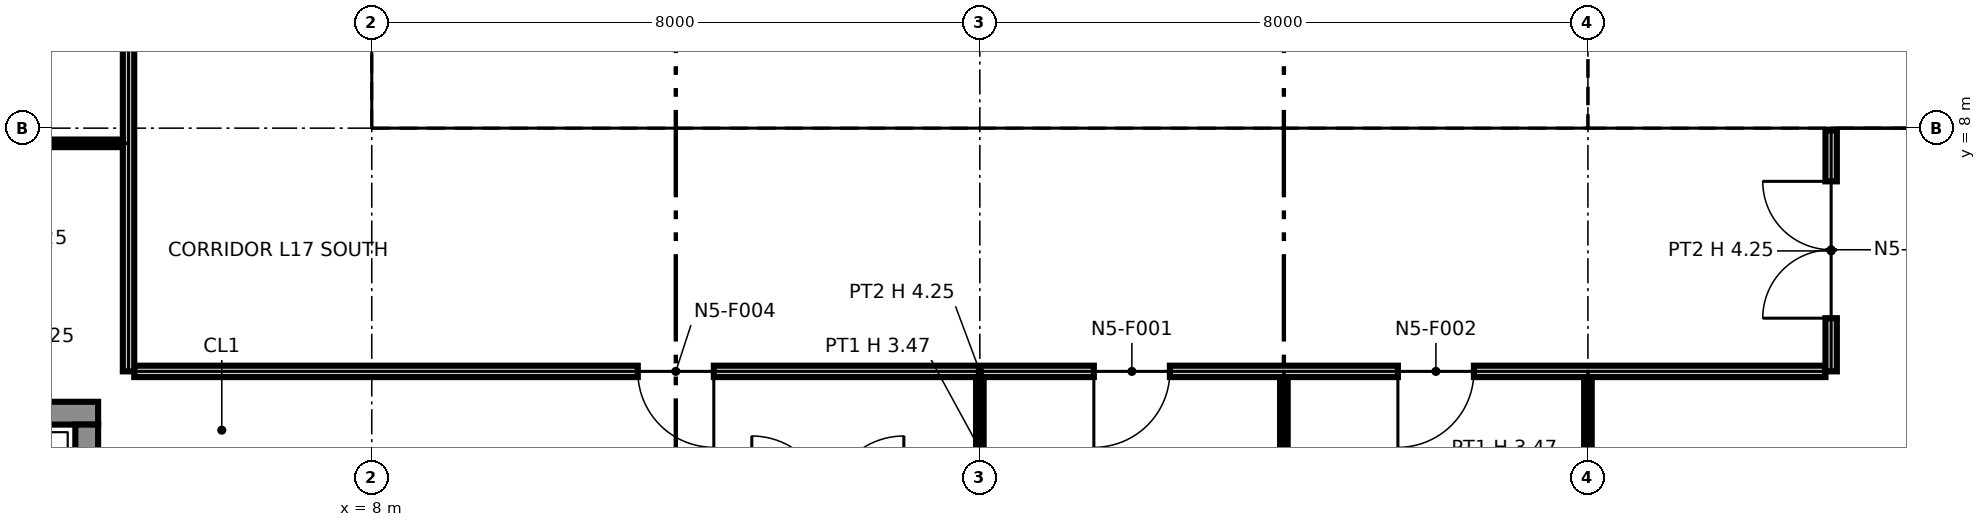
"""IFC4 building model, lengths in metres.
Left out: names, types, materials, properties, quantities, classifications, styles, units other than length and angle.
Written with IfcOpenShell. Run it as: python <this file> out.ifc"""

import sys

from ifc_helpers import new_model, si_unit, direction, frame, frame_2d, origin, origin_2d, place, context, subcontext, project, spatial, polyline, rectangle, i_section, outline, extrude, element, fill, save


model = new_model("IFC4")
c1 = context("Model", 3, precision=1e-05, world=origin(), true_north=direction((0.0, 1.0)))
c2 = subcontext(c1, "Body", "Model", "MODEL_VIEW")
j1 = project(units=[si_unit("LENGTHUNIT", "METRE"), si_unit("PLANEANGLEUNIT", "RADIAN")], contexts=[c1])
p1 = place(None, origin())
s1 = spatial("IfcSite", under=j1, at=p1, CompositionType="ELEMENT")
p2 = place(p1, origin())
s2 = spatial("IfcBuilding", under=s1, at=p2, CompositionType="ELEMENT")
p3 = place(p2, frame((0.0, 0.0, 92.0)))
s3 = spatial("IfcBuildingStorey", under=s2, at=p3, CompositionType="ELEMENT", Elevation=92.0)
for number, where, z_axis, x_axis in (
    (1, (8.0, 8.0, 0.0), (0.0, 0.0, 1.0), (1.0, 0.0, 0.0)),
    (2, (16.0, 8.0, 0.0), (0.0, 0.0, 1.0), (1.0, 0.0, 0.0)),
):
    element("IfcColumn", number, at=place(p3, frame(where, z_axis=z_axis, x_axis=x_axis)), inside=s3, PredefinedType="COLUMN", context=c2, shape_type="SweptSolid", body=[
        extrude(i_section(OverallWidth=0.406, OverallDepth=0.417, WebThickness=0.03, FlangeThickness=0.048, at=origin_2d()), origin(), (0.0, 0.0, 1.0), 4.25),
    ])
p4 = place(p3, frame((24.0, 8.0, 0.0), z_axis=(0.0, 0.0, 1.0), x_axis=(1.0, 0.0, 0.0)))
e3 = element("IfcColumn", 3, at=p4, inside=s3, PredefinedType="COLUMN", context=c2, shape_type="SweptSolid", body=[
    extrude(i_section(OverallWidth=0.411, OverallDepth=0.434, WebThickness=0.036, FlangeThickness=0.057, at=origin_2d()), origin(), (0.0, 0.0, 1.0), 4.25),
])
p5 = place(p3, frame((2.1, 4.25, 0.0), z_axis=(0.0, 0.0, 1.0), x_axis=(1.0, 0.0, 0.0)))
e4 = element("IfcWall", 4, at=p5, inside=s3, PredefinedType="SOLIDWALL", context=c2, shape_type="SweptSolid", body=[
    extrude(rectangle(XDim=2.3, YDim=0.3, at=frame_2d((1.15, 0.0))), origin(), (0.0, 0.0, 1.0), 4.25),
])
p6 = place(p3, frame((4.25, 4.1, 0.0), z_axis=(0.0, 0.0, 1.0), x_axis=(0.0, -1.0, 0.0)))
e5 = element("IfcWall", 5, at=p6, inside=s3, PredefinedType="SOLIDWALL", context=c2, shape_type="SweptSolid", body=[
    extrude(rectangle(XDim=1.7, YDim=0.3, at=frame_2d((0.85, 0.0))), origin(), (0.0, 0.0, 1.0), 4.25),
])
p7 = place(p3, frame((8.65, 8.75, 0.0), z_axis=(0.0, 0.0, 1.0), x_axis=(1.0, 0.0, 0.0)))
e6 = element("IfcWall", 6, at=p7, inside=s3, PredefinedType="PARTITIONING", context=c2, shape_type="SweptSolid", body=[
    extrude(outline(polyline([(0.0, 0.0), (14.7, 0.0), (14.7, 4.25), (7.469, 4.25), (7.469, 3.632), (7.231, 3.632), (7.23, 4.25), (0.0, 4.25), (0.0, 0.0)])), frame((0.0, 0.1, 0.0), z_axis=(0.0, -1.0, 0.0), x_axis=(1.0, 0.0, 0.0)), (0.0, 0.0, 1.0), 0.2),
])
p8 = place(p7, frame((1.3, 0.0, 0.0)))
e7 = element("IfcOpeningElement", 7, at=p8, cuts=e6, PredefinedType="OPENING", context=c2, shape_type="SweptSolid", body=[
    extrude(rectangle(XDim=1.4, YDim=2.1, at=frame_2d((0.7, 1.05))), frame((0.0, 0.11, 0.0), z_axis=(0.0, -1.0, 0.0), x_axis=(1.0, 0.0, 0.0)), (0.0, 0.0, 1.0), 0.22),
])
p9 = place(p7, frame((4.6, 0.0, 0.0)))
e8 = element("IfcOpeningElement", 8, at=p9, cuts=e6, PredefinedType="OPENING", context=c2, shape_type="SweptSolid", body=[
    extrude(rectangle(XDim=1.4, YDim=2.1, at=frame_2d((0.7, 1.05))), frame((0.0, 0.11, 0.0), z_axis=(0.0, -1.0, 0.0), x_axis=(1.0, 0.0, 0.0)), (0.0, 0.0, 1.0), 0.22),
])
p10 = place(p7, frame((10.4, 0.0, 0.0)))
e9 = element("IfcOpeningElement", 9, at=p10, cuts=e6, PredefinedType="OPENING", context=c2, shape_type="SweptSolid", body=[
    extrude(rectangle(XDim=1.2, YDim=2.1, at=frame_2d((0.6, 1.05))), frame((0.0, 0.11, 0.0), z_axis=(0.0, -1.0, 0.0), x_axis=(1.0, 0.0, 0.0)), (0.0, 0.0, 1.0), 0.22),
])
p11 = place(p3, frame((8.75, 8.85, 0.0), z_axis=(0.0, 0.0, 1.0), x_axis=(0.0, 1.0, 0.0)))
e10 = element("IfcWall", 10, at=p11, inside=s3, PredefinedType="PARTITIONING", context=c2, shape_type="SweptSolid", body=[
    extrude(outline(polyline([(0.0, 0.0), (14.3, 0.0), (14.3, 4.25), (10.231, 4.25), (10.23, 3.789), (10.07, 3.789), (10.069, 4.25), (7.27, 4.25), (7.269, 3.632), (7.031, 3.632), (7.031, 4.25), (0.0, 4.25), (0.0, 0.0)])), frame((0.0, 0.1, 0.0), z_axis=(0.0, -1.0, 0.0), x_axis=(1.0, 0.0, 0.0)), (0.0, 0.0, 1.0), 0.2),
])
p12 = place(p11, frame((8.3, 0.0, 0.0)))
e11 = element("IfcOpeningElement", 11, at=p12, cuts=e10, PredefinedType="OPENING", context=c2, shape_type="SweptSolid", body=[
    extrude(rectangle(XDim=1.8, YDim=2.1, at=frame_2d((0.9, 1.05))), frame((0.0, 0.11, 0.0), z_axis=(0.0, -1.0, 0.0), x_axis=(1.0, 0.0, 0.0)), (0.0, 0.0, 1.0), 0.22),
])
p13 = place(p3, frame((12.4, 8.85, 0.0), z_axis=(0.0, 0.0, 1.0), x_axis=(0.0, 1.0, 0.0)))
e12 = element("IfcWall", 12, at=p13, inside=s3, PredefinedType="PARTITIONING", context=c2, shape_type="SweptSolid", body=[
    extrude(rectangle(XDim=6.85, YDim=0.2, at=frame_2d((3.425, 0.0))), origin(), (0.0, 0.0, 1.0), 4.25),
])
p14 = place(p3, frame((15.85, 8.85, 0.0), z_axis=(0.0, 0.0, 1.0), x_axis=(0.0, 1.0, 0.0)))
e13 = element("IfcWall", 13, at=p14, inside=s3, PredefinedType="PARTITIONING", context=c2, shape_type="SweptSolid", body=[
    extrude(rectangle(XDim=1.55, YDim=0.9, at=frame_2d((0.775, 0.0))), origin(), (0.0, 0.0, 1.0), 3.632),
])
p15 = place(p14, frame((0.3, 0.0, 0.0)))
e14 = element("IfcOpeningElement", 14, at=p15, cuts=e13, PredefinedType="OPENING", context=c2, shape_type="SweptSolid", body=[
    extrude(rectangle(XDim=1.1, YDim=2.1, at=frame_2d((0.55, 1.05))), frame((0.0, 0.46, 0.0), z_axis=(0.0, -1.0, 0.0), x_axis=(1.0, 0.0, 0.0)), (0.0, 0.0, 1.0), 0.92),
])
p16 = place(p3, frame((23.25, 8.85, 0.0), z_axis=(0.0, 0.0, 1.0), x_axis=(0.0, 1.0, 0.0)))
e15 = element("IfcWall", 15, at=p16, inside=s3, PredefinedType="PARTITIONING", context=c2, shape_type="SweptSolid", body=[
    extrude(outline(polyline([(0.0, 0.0), (14.3, 0.0), (14.3, 4.25), (11.231, 4.25), (11.23, 3.789), (11.07, 3.789), (11.069, 4.25), (7.27, 4.25), (7.269, 3.632), (7.031, 3.632), (7.031, 4.25), (1.231, 4.25), (1.23, 3.789), (1.07, 3.789), (1.069, 4.25), (0.0, 4.25), (0.0, 0.0)])), frame((0.0, 0.1, 0.0), z_axis=(0.0, -1.0, 0.0), x_axis=(1.0, 0.0, 0.0)), (0.0, 0.0, 1.0), 0.2),
])
p17 = place(p16, frame((8.3, 0.0, 0.0)))
e16 = element("IfcOpeningElement", 16, at=p17, cuts=e15, PredefinedType="OPENING", context=c2, shape_type="SweptSolid", body=[
    extrude(rectangle(XDim=1.8, YDim=2.1, at=frame_2d((0.9, 1.05))), frame((0.0, 0.11, 0.0), z_axis=(0.0, -1.0, 0.0), x_axis=(1.0, 0.0, 0.0)), (0.0, 0.0, 1.0), 0.22),
])
p18 = place(p3, frame((24.65, 8.75, 0.0), z_axis=(0.0, 0.0, 1.0), x_axis=(1.0, 0.0, 0.0)))
e17 = element("IfcWall", 17, at=p18, inside=s3, PredefinedType="PARTITIONING", context=c2, shape_type="SweptSolid", body=[
    extrude(outline(polyline([(0.0, 0.0), (14.7, 0.0), (14.7, 4.25), (7.469, 4.25), (7.469, 3.632), (7.231, 3.632), (7.23, 4.25), (0.0, 4.25), (0.0, 0.0)])), frame((0.0, 0.1, 0.0), z_axis=(0.0, -1.0, 0.0), x_axis=(1.0, 0.0, 0.0)), (0.0, 0.0, 1.0), 0.2),
])
p19 = place(p3, frame((24.75, 8.85, 0.0), z_axis=(0.0, 0.0, 1.0), x_axis=(0.0, 1.0, 0.0)))
e18 = element("IfcWall", 18, at=p19, inside=s3, PredefinedType="PARTITIONING", context=c2, shape_type="SweptSolid", body=[
    extrude(outline(polyline([(0.0, 0.0), (6.3, 0.0), (6.3, 4.25), (3.231, 4.25), (3.23, 3.789), (3.07, 3.789), (3.069, 4.25), (0.0, 4.25), (0.0, 0.0)])), frame((0.0, 0.1, 0.0), z_axis=(0.0, -1.0, 0.0), x_axis=(1.0, 0.0, 0.0)), (0.0, 0.0, 1.0), 0.2),
])
p20 = place(p3, frame((27.875, 8.85, 0.0), z_axis=(0.0, 0.0, 1.0), x_axis=(0.0, 1.0, 0.0)))
e19 = element("IfcWall", 19, at=p20, inside=s3, PredefinedType="PARTITIONING", context=c2, shape_type="SweptSolid", body=[
    extrude(outline(polyline([(0.0, 0.0), (4.2, 0.0), (4.2, 4.25), (3.231, 4.25), (3.23, 3.789), (3.07, 3.789), (3.069, 4.25), (0.0, 4.25), (0.0, 0.0)])), frame((0.0, 0.075, 0.0), z_axis=(0.0, -1.0, 0.0), x_axis=(1.0, 0.0, 0.0)), (0.0, 0.0, 1.0), 0.15),
])
p21 = place(p3, frame((20.0, 0.13, 0.0), z_axis=(0.0, 0.0, 1.0), x_axis=(0.0, 1.0, 0.0)))
e20 = element("IfcWall", 20, at=p21, inside=s3, PredefinedType="PARTITIONING", context=c2, shape_type="SweptSolid", body=[
    extrude(outline(polyline([(0.0, 0.0), (4.595, 0.0), (4.595, 4.25), (4.17, 4.25), (4.168, 3.47), (3.572, 3.47), (3.57, 4.25), (0.0, 4.25), (0.0, 0.0)])), frame((0.0, 0.05, 0.0), z_axis=(0.0, -1.0, 0.0), x_axis=(1.0, 0.0, 0.0)), (0.0, 0.0, 1.0), 0.1),
])
for number, where, z_axis, x_axis in (
    (21, (16.0, 2.83, 0.0), (0.0, 0.0, 1.0), (0.0, 1.0, 0.0)),
    (22, (24.0, 2.83, 0.0), (0.0, 0.0, 1.0), (0.0, 1.0, 0.0)),
):
    element("IfcWall", number, at=place(p3, frame(where, z_axis=z_axis, x_axis=x_axis)), inside=s3, PredefinedType="PARTITIONING", context=c2, shape_type="SweptSolid", body=[
        extrude(rectangle(XDim=1.895, YDim=0.1, at=frame_2d((0.948, 0.0))), origin(), (0.0, 0.0, 1.0), 3.47),
    ])
p22 = place(p3, frame((4.875, 4.8, 0.0), z_axis=(0.0, 0.0, 1.0), x_axis=(1.0, 0.0, 0.0)))
e23 = element("IfcWall", 23, at=p22, inside=s3, PredefinedType="PARTITIONING", context=c2, shape_type="SweptSolid", body=[
    extrude(rectangle(XDim=22.25, YDim=0.15, at=frame_2d((11.125, 0.0))), origin(), (0.0, 0.0, 1.0), 4.25),
])
p23 = place(p22, frame((13.625, 0.0, 0.0), z_axis=(0.0, 0.0, 1.0), x_axis=(-1.0, 0.0, 0.0)))
e24 = element("IfcOpeningElement", 24, at=p23, cuts=e23, PredefinedType="OPENING", context=c2, shape_type="SweptSolid", body=[
    extrude(rectangle(XDim=1.0, YDim=2.1, at=frame_2d((0.5, 1.05))), frame((0.0, 0.085, 0.0), z_axis=(0.0, -1.0, 0.0), x_axis=(1.0, 0.0, 0.0)), (0.0, 0.0, 1.0), 0.17),
])
p24 = place(p22, frame((17.625, 0.0, 0.0), z_axis=(0.0, 0.0, 1.0), x_axis=(-1.0, 0.0, 0.0)))
e25 = element("IfcOpeningElement", 25, at=p24, cuts=e23, PredefinedType="OPENING", context=c2, shape_type="SweptSolid", body=[
    extrude(rectangle(XDim=1.0, YDim=2.1, at=frame_2d((0.5, 1.05))), frame((0.0, 0.085, 0.0), z_axis=(0.0, -1.0, 0.0), x_axis=(1.0, 0.0, 0.0)), (0.0, 0.0, 1.0), 0.17),
])
p25 = place(p22, frame((7.625, 0.0, 0.0), z_axis=(0.0, 0.0, 1.0), x_axis=(-1.0, 0.0, 0.0)))
e26 = element("IfcOpeningElement", 26, at=p25, cuts=e23, PredefinedType="OPENING", context=c2, shape_type="SweptSolid", body=[
    extrude(rectangle(XDim=1.0, YDim=2.1, at=frame_2d((0.5, 1.05))), frame((0.0, 0.085, 0.0), z_axis=(0.0, -1.0, 0.0), x_axis=(1.0, 0.0, 0.0)), (0.0, 0.0, 1.0), 0.17),
])
p26 = place(p3, frame((4.8, 4.8, 0.0), z_axis=(0.0, 0.0, 1.0), x_axis=(0.0, 1.0, 0.0)))
e27 = element("IfcWall", 27, at=p26, inside=s3, PredefinedType="PARTITIONING", context=c2, shape_type="SweptSolid", body=[
    extrude(outline(polyline([(0.0, 0.0), (14.575, 0.0), (14.575, 4.25), (11.5, 4.25), (11.498, 3.47), (10.902, 3.47), (10.9, 4.25), (7.5, 4.25), (7.498, 3.47), (6.902, 3.47), (6.9, 4.25), (3.5, 4.25), (3.498, 3.47), (2.902, 3.47), (2.9, 4.25), (0.0, 4.25), (0.0, 0.0)])), frame((0.0, 0.075, 0.0), z_axis=(0.0, -1.0, 0.0), x_axis=(1.0, 0.0, 0.0)), (0.0, 0.0, 1.0), 0.15),
])
p27 = place(p26, frame((12.425, 0.0, 0.0)))
e28 = element("IfcOpeningElement", 28, at=p27, cuts=e27, PredefinedType="OPENING", context=c2, shape_type="SweptSolid", body=[
    extrude(rectangle(XDim=1.0, YDim=2.1, at=frame_2d((0.5, 1.05))), frame((0.0, 0.085, 0.0), z_axis=(0.0, -1.0, 0.0), x_axis=(1.0, 0.0, 0.0)), (0.0, 0.0, 1.0), 0.17),
])
p28 = place(p3, frame((27.2, 4.8, 0.0), z_axis=(0.0, 0.0, 1.0), x_axis=(0.0, 1.0, 0.0)))
e29 = element("IfcWall", 29, at=p28, inside=s3, PredefinedType="PARTITIONING", context=c2, shape_type="SweptSolid", body=[
    extrude(rectangle(XDim=3.17, YDim=0.15, at=frame_2d((1.585, 0.0))), origin(), (0.0, 0.0, 1.0), 4.25),
])
p29 = place(p28, frame((0.7, 0.0, 0.0)))
e30 = element("IfcOpeningElement", 30, at=p29, cuts=e29, PredefinedType="OPENING", context=c2, shape_type="SweptSolid", body=[
    extrude(rectangle(XDim=1.8, YDim=2.1, at=frame_2d((0.9, 1.05))), frame((0.0, 0.085, 0.0), z_axis=(0.0, -1.0, 0.0), x_axis=(1.0, 0.0, 0.0)), (0.0, 0.0, 1.0), 0.17),
])
p30 = place(p3, frame((0.43, 7.8, 0.0), z_axis=(0.0, 0.0, 1.0), x_axis=(1.0, 0.0, 0.0)))
e31 = element("IfcWall", 31, at=p30, inside=s3, PredefinedType="PARTITIONING", context=c2, shape_type="SweptSolid", body=[
    extrude(rectangle(XDim=4.295, YDim=0.1, at=frame_2d((2.147, 0.0))), origin(), (0.0, 0.0, 1.0), 4.25),
])
p31 = place(p30, frame((2.52, 0.0, 0.0), z_axis=(0.0, 0.0, 1.0), x_axis=(-1.0, 0.0, 0.0)))
e32 = element("IfcOpeningElement", 32, at=p31, cuts=e31, PredefinedType="OPENING", context=c2, shape_type="SweptSolid", body=[
    extrude(rectangle(XDim=1.0, YDim=2.1, at=frame_2d((0.5, 1.05))), frame((0.0, 0.06, 0.0), z_axis=(0.0, -1.0, 0.0), x_axis=(1.0, 0.0, 0.0)), (0.0, 0.0, 1.0), 0.12),
])
p32 = place(p8, origin())
e33 = element("IfcDoor", 33, at=p32, inside=s3, OperationType="DOUBLE_DOOR_SINGLE_SWING", PredefinedType="NOTDEFINED", context=c2, shape_type="SweptSolid", body=[
    extrude(rectangle(XDim=1.4, YDim=2.1, at=frame_2d((0.7, 1.05))), frame((0.0, 0.025, 0.0), z_axis=(0.0, -1.0, 0.0), x_axis=(1.0, 0.0, 0.0)), (0.0, 0.0, 1.0), 0.05),
])
fill(e7, e33)
p33 = place(p9, origin())
e34 = element("IfcDoor", 34, at=p33, inside=s3, OperationType="DOUBLE_DOOR_SINGLE_SWING", PredefinedType="NOTDEFINED", context=c2, shape_type="SweptSolid", body=[
    extrude(rectangle(XDim=1.4, YDim=2.1, at=frame_2d((0.7, 1.05))), frame((0.0, 0.025, 0.0), z_axis=(0.0, -1.0, 0.0), x_axis=(1.0, 0.0, 0.0)), (0.0, 0.0, 1.0), 0.05),
])
fill(e8, e34)
p34 = place(p10, origin())
e35 = element("IfcDoor", 35, at=p34, inside=s3, OperationType="SINGLE_SWING_LEFT", PredefinedType="NOTDEFINED", context=c2, shape_type="SweptSolid", body=[
    extrude(rectangle(XDim=1.2, YDim=2.1, at=frame_2d((0.6, 1.05))), frame((0.0, 0.025, 0.0), z_axis=(0.0, -1.0, 0.0), x_axis=(1.0, 0.0, 0.0)), (0.0, 0.0, 1.0), 0.05),
])
fill(e9, e35)
p35 = place(p23, origin())
e36 = element("IfcDoor", 36, at=p35, inside=s3, OperationType="SINGLE_SWING_RIGHT", PredefinedType="DOOR", context=c2, shape_type="SweptSolid", body=[
    extrude(rectangle(XDim=1.0, YDim=2.1, at=frame_2d((0.5, 1.05))), frame((0.0, 0.025, 0.0), z_axis=(0.0, -1.0, 0.0), x_axis=(1.0, 0.0, 0.0)), (0.0, 0.0, 1.0), 0.05),
])
fill(e24, e36)
p36 = place(p24, origin())
e37 = element("IfcDoor", 37, at=p36, inside=s3, OperationType="SINGLE_SWING_RIGHT", PredefinedType="DOOR", context=c2, shape_type="SweptSolid", body=[
    extrude(rectangle(XDim=1.0, YDim=2.1, at=frame_2d((0.5, 1.05))), frame((0.0, 0.025, 0.0), z_axis=(0.0, -1.0, 0.0), x_axis=(1.0, 0.0, 0.0)), (0.0, 0.0, 1.0), 0.05),
])
fill(e25, e37)
p37 = place(p29, origin())
e38 = element("IfcDoor", 38, at=p37, inside=s3, OperationType="DOUBLE_DOOR_SINGLE_SWING", PredefinedType="DOOR", context=c2, shape_type="SweptSolid", body=[
    extrude(rectangle(XDim=1.8, YDim=2.1, at=frame_2d((0.9, 1.05))), frame((0.0, 0.025, 0.0), z_axis=(0.0, -1.0, 0.0), x_axis=(1.0, 0.0, 0.0)), (0.0, 0.0, 1.0), 0.05),
])
fill(e30, e38)
p38 = place(p25, origin())
e39 = element("IfcDoor", 39, at=p38, inside=s3, OperationType="SINGLE_SWING_LEFT", PredefinedType="DOOR", context=c2, shape_type="SweptSolid", body=[
    extrude(rectangle(XDim=1.0, YDim=2.1, at=frame_2d((0.5, 1.05))), frame((0.0, 0.025, 0.0), z_axis=(0.0, -1.0, 0.0), x_axis=(1.0, 0.0, 0.0)), (0.0, 0.0, 1.0), 0.05),
])
fill(e26, e39)
save(model, sys.argv[1])
